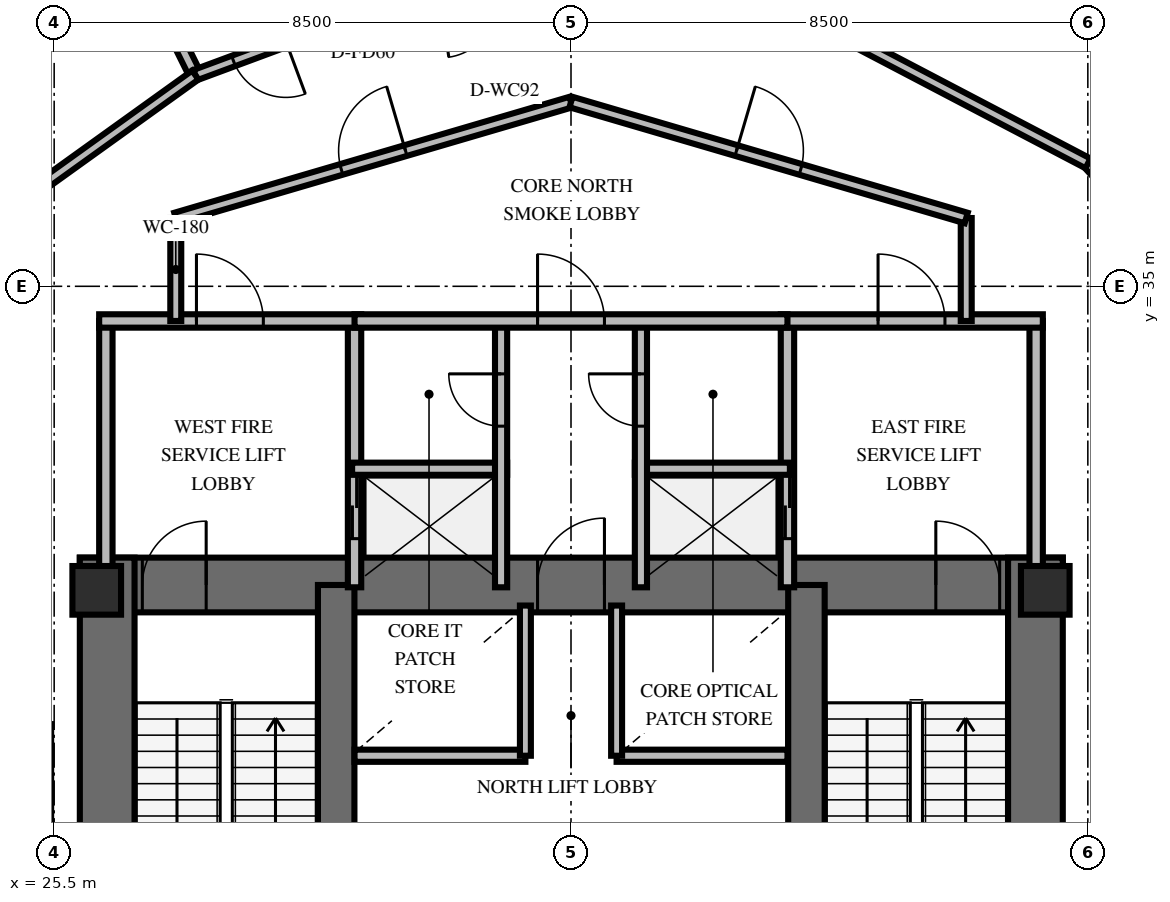
"""IFC4 building model, lengths in metres.
Left out: names, types, materials, properties, quantities, classifications, styles, units other than length and angle.
Written with IfcOpenShell. Run it as: python <this file> out.ifc"""

import sys

from ifc_helpers import new_model, si_unit, direction, frame, frame_2d, origin, origin_2d, place, context, subcontext, project, spatial, rectangle, extrude, element, fill, save


model = new_model("IFC4")
c1 = context("Model", 3, precision=1e-05, world=origin(), true_north=direction((0.0, 1.0)))
c2 = subcontext(c1, "Body", "Model", "MODEL_VIEW")
j1 = project(units=[si_unit("LENGTHUNIT", "METRE"), si_unit("PLANEANGLEUNIT", "RADIAN")], contexts=[c1])
p1 = place(None, origin())
s1 = spatial("IfcSite", under=j1, at=p1, CompositionType="ELEMENT")
p2 = place(p1, origin())
s2 = spatial("IfcBuilding", under=s1, at=p2, CompositionType="ELEMENT")
p3 = place(p2, frame((0.0, 0.0, 84.6)))
s3 = spatial("IfcBuildingStorey", under=s2, at=p3, CompositionType="ELEMENT", Elevation=84.6)
p4 = place(p3, frame((25.922, 30.088, 0.0), z_axis=(0.0, 0.0, 1.0), x_axis=(1.0, 0.0, 0.0)))
e1 = element("IfcWall", 1, at=p4, inside=s3, PredefinedType="SHEAR", context=c2, shape_type="SweptSolid", body=[
    extrude(rectangle(XDim=16.166, YDim=0.9, at=frame_2d((8.083, 0.0))), origin(), (0.0, 0.0, 1.0), 4.2),
])
p5 = place(p4, frame((1.028, 0.0, 0.0)))
e2 = element("IfcOpeningElement", 2, at=p5, cuts=e1, PredefinedType="OPENING", context=c2, shape_type="SweptSolid", body=[
    extrude(rectangle(XDim=1.05, YDim=2.15, at=frame_2d((0.525, 1.075))), frame((0.0, 0.46, 0.0), z_axis=(0.0, -1.0, 0.0), x_axis=(1.0, 0.0, 0.0)), (0.0, 0.0, 1.0), 0.92),
])
p6 = place(p4, frame((14.078, 0.0, 0.0)))
e3 = element("IfcOpeningElement", 3, at=p6, cuts=e1, PredefinedType="OPENING", context=c2, shape_type="SweptSolid", body=[
    extrude(rectangle(XDim=1.05, YDim=2.15, at=frame_2d((0.525, 1.075))), frame((0.0, 0.46, 0.0), z_axis=(0.0, -1.0, 0.0), x_axis=(1.0, 0.0, 0.0)), (0.0, 0.0, 1.0), 0.92),
])
p7 = place(p4, frame((7.528, 0.0, 0.0)))
e4 = element("IfcOpeningElement", 4, at=p7, cuts=e1, PredefinedType="OPENING", context=c2, shape_type="SweptSolid", body=[
    extrude(rectangle(XDim=1.1, YDim=2.15, at=frame_2d((0.55, 1.075))), frame((0.0, 0.46, 0.0), z_axis=(0.0, -1.0, 0.0), x_axis=(1.0, 0.0, 0.0)), (0.0, 0.0, 1.0), 0.92),
])
for number, where, z_axis, x_axis in (
    (5, (26.372, 19.662, 0.0), (0.0, 0.0, 1.0), (0.0, 1.0, 0.0)),
    (6, (41.638, 19.662, 0.0), (0.0, 0.0, 1.0), (0.0, 1.0, 0.0)),
):
    element("IfcWall", number, at=place(p3, frame(where, z_axis=z_axis, x_axis=x_axis)), inside=s3, PredefinedType="SHEAR", context=c2, shape_type="SweptSolid", body=[
        extrude(rectangle(XDim=10.876, YDim=0.9, at=frame_2d((5.438, 0.0))), origin(), (0.0, 0.0, 1.0), 4.2),
    ])
for number, where, z_axis, x_axis in (
    (7, (30.138, 20.112, 0.0), (0.0, 0.0, 1.0), (0.0, 1.0, 0.0)),
    (8, (37.872, 20.112, 0.0), (0.0, 0.0, 1.0), (0.0, 1.0, 0.0)),
):
    element("IfcWall", number, at=place(p3, frame(where, z_axis=z_axis, x_axis=x_axis)), inside=s3, PredefinedType="SHEAR", context=c2, shape_type="SweptSolid", body=[
        extrude(rectangle(XDim=9.976, YDim=0.6, at=frame_2d((4.988, 0.0))), origin(), (0.0, 0.0, 1.0), 4.2),
    ])
for number, where, z_axis, x_axis in (
    (9, (26.2, 30.0, 0.0), (0.0, 0.0, 1.0), (1.0, 0.0, 0.0)),
    (10, (41.8, 30.0, 0.0), (0.0, 0.0, 1.0), (1.0, 0.0, 0.0)),
):
    element("IfcColumn", number, at=place(p3, frame(where, z_axis=z_axis, x_axis=x_axis)), inside=s3, PredefinedType="PILASTER", context=c2, shape_type="SweptSolid", body=[
        extrude(rectangle(XDim=0.8, YDim=0.8, at=origin_2d()), origin(), (0.0, 0.0, 1.0), 4.2),
    ])
p8 = place(p3, frame((26.35, 30.05, 0.0), z_axis=(0.0, 0.0, 1.0), x_axis=(0.0, 1.0, 0.0)))
e11 = element("IfcWall", 11, at=p8, inside=s3, PredefinedType="SOLIDWALL", context=c2, shape_type="SweptSolid", body=[
    extrude(rectangle(XDim=4.38, YDim=0.22, at=frame_2d((2.19, 0.0))), origin(), (0.0, 0.0, 1.0), 2.96),
])
p9 = place(p3, frame((30.44, 30.05, 0.0), z_axis=(0.0, 0.0, 1.0), x_axis=(0.0, 1.0, 0.0)))
e12 = element("IfcWall", 12, at=p9, inside=s3, PredefinedType="SOLIDWALL", context=c2, shape_type="SweptSolid", body=[
    extrude(rectangle(XDim=4.38, YDim=0.22, at=frame_2d((2.19, 0.0))), origin(), (0.0, 0.0, 1.0), 2.96),
])
p10 = place(p9, frame((0.8, 0.0, 0.0)))
e13 = element("IfcOpeningElement", 13, at=p10, cuts=e12, PredefinedType="OPENING", context=c2, shape_type="SweptSolid", body=[
    extrude(rectangle(XDim=1.05, YDim=2.1, at=frame_2d((0.525, 1.05))), frame((0.0, 0.12, 0.0), z_axis=(0.0, -1.0, 0.0), x_axis=(1.0, 0.0, 0.0)), (0.0, 0.0, 1.0), 0.24),
])
p11 = place(p3, frame((26.24, 34.43, 0.0), z_axis=(0.0, 0.0, 1.0), x_axis=(1.0, 0.0, 0.0)))
e14 = element("IfcWall", 14, at=p11, inside=s3, PredefinedType="SOLIDWALL", context=c2, shape_type="SweptSolid", body=[
    extrude(rectangle(XDim=4.31, YDim=0.22, at=frame_2d((2.155, 0.0))), origin(), (0.0, 0.0, 1.0), 2.96),
])
p12 = place(p11, frame((1.6, 0.0, 0.0)))
e15 = element("IfcOpeningElement", 15, at=p12, cuts=e14, PredefinedType="OPENING", context=c2, shape_type="SweptSolid", body=[
    extrude(rectangle(XDim=1.1, YDim=2.15, at=frame_2d((0.55, 1.075))), frame((0.0, 0.12, 0.0), z_axis=(0.0, -1.0, 0.0), x_axis=(1.0, 0.0, 0.0)), (0.0, 0.0, 1.0), 0.24),
])
p13 = place(p3, frame((30.4, 32.0, 0.0), z_axis=(0.0, 0.0, 1.0), x_axis=(1.0, 0.0, 0.0)))
e16 = element("IfcWall", 16, at=p13, inside=s3, PredefinedType="SOLIDWALL", context=c2, shape_type="SweptSolid", body=[
    extrude(rectangle(XDim=2.55, YDim=0.2, at=frame_2d((1.275, 0.0))), origin(), (0.0, 0.0, 1.0), 2.96),
])
p14 = place(p3, frame((32.85, 30.05, 0.0), z_axis=(0.0, 0.0, 1.0), x_axis=(0.0, 1.0, 0.0)))
e17 = element("IfcWall", 17, at=p14, inside=s3, PredefinedType="SOLIDWALL", context=c2, shape_type="SweptSolid", body=[
    extrude(rectangle(XDim=4.38, YDim=0.2, at=frame_2d((2.19, 0.0))), origin(), (0.0, 0.0, 1.0), 2.96),
])
p15 = place(p14, frame((2.65, 0.0, 0.0)))
e18 = element("IfcOpeningElement", 18, at=p15, cuts=e17, PredefinedType="OPENING", context=c2, shape_type="SweptSolid", body=[
    extrude(rectangle(XDim=0.86, YDim=2.05, at=frame_2d((0.43, 1.025))), frame((0.0, 0.11, 0.0), z_axis=(0.0, -1.0, 0.0), x_axis=(1.0, 0.0, 0.0)), (0.0, 0.0, 1.0), 0.22),
])
p16 = place(p3, frame((37.56, 30.05, 0.0), z_axis=(0.0, 0.0, 1.0), x_axis=(0.0, 1.0, 0.0)))
e19 = element("IfcWall", 19, at=p16, inside=s3, PredefinedType="SOLIDWALL", context=c2, shape_type="SweptSolid", body=[
    extrude(rectangle(XDim=4.38, YDim=0.22, at=frame_2d((2.19, 0.0))), origin(), (0.0, 0.0, 1.0), 2.96),
])
p17 = place(p16, frame((0.8, 0.0, 0.0)))
e20 = element("IfcOpeningElement", 20, at=p17, cuts=e19, PredefinedType="OPENING", context=c2, shape_type="SweptSolid", body=[
    extrude(rectangle(XDim=1.05, YDim=2.1, at=frame_2d((0.525, 1.05))), frame((0.0, 0.12, 0.0), z_axis=(0.0, -1.0, 0.0), x_axis=(1.0, 0.0, 0.0)), (0.0, 0.0, 1.0), 0.24),
])
p18 = place(p3, frame((41.65, 30.05, 0.0), z_axis=(0.0, 0.0, 1.0), x_axis=(0.0, 1.0, 0.0)))
e21 = element("IfcWall", 21, at=p18, inside=s3, PredefinedType="SOLIDWALL", context=c2, shape_type="SweptSolid", body=[
    extrude(rectangle(XDim=4.38, YDim=0.22, at=frame_2d((2.19, 0.0))), origin(), (0.0, 0.0, 1.0), 2.96),
])
p19 = place(p3, frame((37.45, 34.43, 0.0), z_axis=(0.0, 0.0, 1.0), x_axis=(1.0, 0.0, 0.0)))
e22 = element("IfcWall", 22, at=p19, inside=s3, PredefinedType="SOLIDWALL", context=c2, shape_type="SweptSolid", body=[
    extrude(rectangle(XDim=4.31, YDim=0.22, at=frame_2d((2.155, 0.0))), origin(), (0.0, 0.0, 1.0), 2.96),
])
p20 = place(p19, frame((1.6, 0.0, 0.0)))
e23 = element("IfcOpeningElement", 23, at=p20, cuts=e22, PredefinedType="OPENING", context=c2, shape_type="SweptSolid", body=[
    extrude(rectangle(XDim=1.1, YDim=2.15, at=frame_2d((0.55, 1.075))), frame((0.0, 0.12, 0.0), z_axis=(0.0, -1.0, 0.0), x_axis=(1.0, 0.0, 0.0)), (0.0, 0.0, 1.0), 0.24),
])
p21 = place(p3, frame((35.05, 32.0, 0.0), z_axis=(0.0, 0.0, 1.0), x_axis=(1.0, 0.0, 0.0)))
e24 = element("IfcWall", 24, at=p21, inside=s3, PredefinedType="SOLIDWALL", context=c2, shape_type="SweptSolid", body=[
    extrude(rectangle(XDim=2.55, YDim=0.2, at=frame_2d((1.275, 0.0))), origin(), (0.0, 0.0, 1.0), 2.96),
])
p22 = place(p3, frame((35.15, 30.05, 0.0), z_axis=(0.0, 0.0, 1.0), x_axis=(0.0, 1.0, 0.0)))
e25 = element("IfcWall", 25, at=p22, inside=s3, PredefinedType="SOLIDWALL", context=c2, shape_type="SweptSolid", body=[
    extrude(rectangle(XDim=4.38, YDim=0.2, at=frame_2d((2.19, 0.0))), origin(), (0.0, 0.0, 1.0), 2.96),
])
p23 = place(p22, frame((2.65, 0.0, 0.0)))
e26 = element("IfcOpeningElement", 26, at=p23, cuts=e25, PredefinedType="OPENING", context=c2, shape_type="SweptSolid", body=[
    extrude(rectangle(XDim=0.86, YDim=2.05, at=frame_2d((0.43, 1.025))), frame((0.0, 0.11, 0.0), z_axis=(0.0, -1.0, 0.0), x_axis=(1.0, 0.0, 0.0)), (0.0, 0.0, 1.0), 0.22),
])
p24 = place(p3, frame((30.44, 34.43, 0.0), z_axis=(0.0, 0.0, 1.0), x_axis=(1.0, 0.0, 0.0)))
e27 = element("IfcWall", 27, at=p24, inside=s3, PredefinedType="SOLIDWALL", context=c2, shape_type="SweptSolid", body=[
    extrude(rectangle(XDim=7.12, YDim=0.22, at=frame_2d((3.56, 0.0))), origin(), (0.0, 0.0, 1.0), 2.96),
])
p25 = place(p24, frame((3.01, 0.0, 0.0)))
e28 = element("IfcOpeningElement", 28, at=p25, cuts=e27, PredefinedType="OPENING", context=c2, shape_type="SweptSolid", body=[
    extrude(rectangle(XDim=1.1, YDim=2.15, at=frame_2d((0.55, 1.075))), frame((0.0, 0.12, 0.0), z_axis=(0.0, -1.0, 0.0), x_axis=(1.0, 0.0, 0.0)), (0.0, 0.0, 1.0), 0.24),
])
p26 = place(p3, frame((30.44, 27.28, 0.0), z_axis=(0.0, 0.0, 1.0), x_axis=(1.0, 0.0, 0.0)))
e29 = element("IfcWall", 29, at=p26, inside=s3, PredefinedType="SOLIDWALL", context=c2, shape_type="SweptSolid", body=[
    extrude(rectangle(XDim=2.81, YDim=0.2, at=frame_2d((1.405, 0.0))), origin(), (0.0, 0.0, 1.0), 2.96),
])
p27 = place(p3, frame((33.25, 27.28, 0.0), z_axis=(0.0, 0.0, 1.0), x_axis=(0.0, 1.0, 0.0)))
e30 = element("IfcWall", 30, at=p27, inside=s3, PredefinedType="SOLIDWALL", context=c2, shape_type="SweptSolid", body=[
    extrude(rectangle(XDim=2.47, YDim=0.18, at=frame_2d((1.235, 0.0))), origin(), (0.0, 0.0, 1.0), 2.96),
])
p28 = place(p3, frame((34.75, 27.28, 0.0), z_axis=(0.0, 0.0, 1.0), x_axis=(1.0, 0.0, 0.0)))
e31 = element("IfcWall", 31, at=p28, inside=s3, PredefinedType="SOLIDWALL", context=c2, shape_type="SweptSolid", body=[
    extrude(rectangle(XDim=2.81, YDim=0.2, at=frame_2d((1.405, 0.0))), origin(), (0.0, 0.0, 1.0), 2.96),
])
p29 = place(p3, frame((34.75, 27.28, 0.0), z_axis=(0.0, 0.0, 1.0), x_axis=(0.0, 1.0, 0.0)))
e32 = element("IfcWall", 32, at=p29, inside=s3, PredefinedType="SOLIDWALL", context=c2, shape_type="SweptSolid", body=[
    extrude(rectangle(XDim=2.47, YDim=0.18, at=frame_2d((1.235, 0.0))), origin(), (0.0, 0.0, 1.0), 2.96),
])
for number, where, z_axis, x_axis in (
    (33, (27.5, 34.43, 0.0), (0.0, 0.0, 1.0), (0.0, 1.0, 0.0)),
    (34, (40.5, 36.123, 0.0), (0.0, 0.0, 1.0), (0.0, -1.0, 0.0)),
):
    element("IfcWall", number, at=place(p3, frame(where, z_axis=z_axis, x_axis=x_axis)), inside=s3, PredefinedType="PARTITIONING", context=c2, shape_type="SweptSolid", body=[
        extrude(rectangle(XDim=1.693, YDim=0.18, at=frame_2d((0.846, 0.0))), origin(), (0.0, 0.0, 1.0), 2.96),
    ])
p30 = place(p3, frame((27.5, 36.123, 0.0), z_axis=(0.0, 0.0, 1.0), x_axis=(0.959546654541, 0.281549671923, 0.0)))
e35 = element("IfcWall", 35, at=p30, inside=s3, PredefinedType="PARTITIONING", context=c2, shape_type="SweptSolid", body=[
    extrude(rectangle(XDim=6.774, YDim=0.18, at=frame_2d((3.387, 0.0))), origin(), (0.0, 0.0, 1.0), 2.96),
])
p31 = place(p30, frame((2.837, 0.0, 0.0)))
e36 = element("IfcOpeningElement", 36, at=p31, cuts=e35, PredefinedType="OPENING", context=c2, shape_type="SweptSolid", body=[
    extrude(rectangle(XDim=1.1, YDim=2.15, at=frame_2d((0.55, 1.075))), frame((0.0, 0.1, 0.0), z_axis=(0.0, -1.0, 0.0), x_axis=(1.0, 0.0, 0.0)), (0.0, 0.0, 1.0), 0.2),
])
p32 = place(p3, frame((34.0, 38.03, 0.0), z_axis=(0.0, 0.0, 1.0), x_axis=(0.959546654541, -0.281549671923, 0.0)))
e37 = element("IfcWall", 37, at=p32, inside=s3, PredefinedType="PARTITIONING", context=c2, shape_type="SweptSolid", body=[
    extrude(rectangle(XDim=6.774, YDim=0.18, at=frame_2d((3.387, 0.0))), origin(), (0.0, 0.0, 1.0), 2.96),
])
p33 = place(p32, frame((2.837, 0.0, 0.0)))
e38 = element("IfcOpeningElement", 38, at=p33, cuts=e37, PredefinedType="OPENING", context=c2, shape_type="SweptSolid", body=[
    extrude(rectangle(XDim=1.1, YDim=2.15, at=frame_2d((0.55, 1.075))), frame((0.0, 0.1, 0.0), z_axis=(0.0, -1.0, 0.0), x_axis=(1.0, 0.0, 0.0)), (0.0, 0.0, 1.0), 0.2),
])
p34 = place(p3, frame((27.822, 38.474, 0.0), z_axis=(0.0, 0.0, 1.0), x_axis=(-0.443837252061, 0.896107411912, 0.0)))
e39 = element("IfcWall", 39, at=p34, inside=s3, PredefinedType="PLUMBINGWALL", context=c2, shape_type="SweptSolid", body=[
    extrude(rectangle(XDim=1.65, YDim=0.2, at=frame_2d((0.825, 0.0))), origin(), (0.0, 0.0, 1.0), 2.96),
])
p35 = place(p3, frame((30.55, 39.486, 0.0), z_axis=(0.0, 0.0, 1.0), x_axis=(-0.937591807845, -0.34773783496, 0.0)))
e40 = element("IfcWall", 40, at=p35, inside=s3, PredefinedType="PARTITIONING", context=c2, shape_type="SweptSolid", body=[
    extrude(rectangle(XDim=2.91, YDim=0.18, at=frame_2d((1.455, 0.0))), origin(), (0.0, 0.0, 1.0), 2.96),
])
p36 = place(p35, frame((1.321, 0.0, 0.0)))
e41 = element("IfcOpeningElement", 41, at=p36, cuts=e40, PredefinedType="OPENING", context=c2, shape_type="SweptSolid", body=[
    extrude(rectangle(XDim=0.92, YDim=2.1, at=frame_2d((0.46, 1.05))), frame((0.0, 0.1, 0.0), z_axis=(0.0, -1.0, 0.0), x_axis=(1.0, 0.0, 0.0)), (0.0, 0.0, 1.0), 0.2),
])
p37 = place(p3, frame((27.822, 38.474, 0.0), z_axis=(0.0, 0.0, 1.0), x_axis=(-0.812254756388, -0.583302846492, 0.0)))
e42 = element("IfcWall", 42, at=p37, inside=s3, PredefinedType="PARTITIONING", context=c2, shape_type="SweptSolid", body=[
    extrude(rectangle(XDim=4.515, YDim=0.18, at=frame_2d((2.257, 0.0))), origin(), (0.0, 0.0, 1.0), 2.96),
])
p38 = place(p3, frame((45.76, 33.448, 0.0), z_axis=(0.0, 0.0, 1.0), x_axis=(-0.673677614221, 0.739025352811, 0.0)))
e43 = element("IfcWall", 43, at=p38, inside=s3, PredefinedType="PARTITIONING", context=c2, shape_type="SweptSolid", body=[
    extrude(rectangle(XDim=4.834, YDim=0.18, at=frame_2d((2.417, 0.0))), origin(), (0.0, 0.0, 1.0), 2.96),
])
p39 = place(p38, frame((2.801, 0.0, 0.0)))
e44 = element("IfcOpeningElement", 44, at=p39, cuts=e43, PredefinedType="OPENING", context=c2, shape_type="SweptSolid", body=[
    extrude(rectangle(XDim=1.0, YDim=2.15, at=frame_2d((0.5, 1.075))), frame((0.0, 0.1, 0.0), z_axis=(0.0, -1.0, 0.0), x_axis=(1.0, 0.0, 0.0)), (0.0, 0.0, 1.0), 0.2),
])
p40 = place(p3, frame((42.503, 37.021, 0.0), z_axis=(0.0, 0.0, 1.0), x_axis=(-0.885791991461, 0.464082479591, 0.0)))
e45 = element("IfcWall", 45, at=p40, inside=s3, PredefinedType="PARTITIONING", context=c2, shape_type="SweptSolid", body=[
    extrude(rectangle(XDim=4.834, YDim=0.18, at=frame_2d((2.417, 0.0))), origin(), (0.0, 0.0, 1.0), 2.96),
])
p41 = place(p5, origin())
e46 = element("IfcDoor", 46, at=p41, inside=s3, OperationType="SINGLE_SWING_RIGHT", PredefinedType="DOOR", context=c2, shape_type="SweptSolid", body=[
    extrude(rectangle(XDim=1.05, YDim=2.15, at=frame_2d((0.525, 1.075))), frame((0.0, 0.025, 0.0), z_axis=(0.0, -1.0, 0.0), x_axis=(1.0, 0.0, 0.0)), (0.0, 0.0, 1.0), 0.05),
])
fill(e2, e46)
p42 = place(p6, origin())
e47 = element("IfcDoor", 47, at=p42, inside=s3, OperationType="SINGLE_SWING_LEFT", PredefinedType="DOOR", context=c2, shape_type="SweptSolid", body=[
    extrude(rectangle(XDim=1.05, YDim=2.15, at=frame_2d((0.525, 1.075))), frame((0.0, 0.025, 0.0), z_axis=(0.0, -1.0, 0.0), x_axis=(1.0, 0.0, 0.0)), (0.0, 0.0, 1.0), 0.05),
])
fill(e3, e47)
p43 = place(p7, origin())
e48 = element("IfcDoor", 48, at=p43, inside=s3, OperationType="SINGLE_SWING_RIGHT", PredefinedType="DOOR", context=c2, shape_type="SweptSolid", body=[
    extrude(rectangle(XDim=1.1, YDim=2.15, at=frame_2d((0.55, 1.075))), frame((0.0, 0.025, 0.0), z_axis=(0.0, -1.0, 0.0), x_axis=(1.0, 0.0, 0.0)), (0.0, 0.0, 1.0), 0.05),
])
fill(e4, e48)
p44 = place(p12, origin())
e49 = element("IfcDoor", 49, at=p44, inside=s3, OperationType="SINGLE_SWING_LEFT", PredefinedType="DOOR", context=c2, shape_type="SweptSolid", body=[
    extrude(rectangle(XDim=1.1, YDim=2.15, at=frame_2d((0.55, 1.075))), frame((0.0, 0.025, 0.0), z_axis=(0.0, -1.0, 0.0), x_axis=(1.0, 0.0, 0.0)), (0.0, 0.0, 1.0), 0.05),
])
fill(e15, e49)
p45 = place(p10, origin())
e50 = element("IfcDoor", 50, at=p45, inside=s3, OperationType="DOUBLE_DOOR_SLIDING", PredefinedType="USERDEFINED", context=c2, shape_type="SweptSolid", body=[
    extrude(rectangle(XDim=1.05, YDim=2.1, at=frame_2d((0.525, 1.05))), frame((0.0, 0.025, 0.0), z_axis=(0.0, -1.0, 0.0), x_axis=(1.0, 0.0, 0.0)), (0.0, 0.0, 1.0), 0.05),
])
fill(e13, e50)
p46 = place(p15, origin())
e51 = element("IfcDoor", 51, at=p46, inside=s3, OperationType="SINGLE_SWING_RIGHT", PredefinedType="TRAPDOOR", context=c2, shape_type="SweptSolid", body=[
    extrude(rectangle(XDim=0.86, YDim=2.05, at=frame_2d((0.43, 1.025))), frame((0.0, 0.025, 0.0), z_axis=(0.0, -1.0, 0.0), x_axis=(1.0, 0.0, 0.0)), (0.0, 0.0, 1.0), 0.05),
])
fill(e18, e51)
p47 = place(p20, origin())
e52 = element("IfcDoor", 52, at=p47, inside=s3, OperationType="SINGLE_SWING_LEFT", PredefinedType="DOOR", context=c2, shape_type="SweptSolid", body=[
    extrude(rectangle(XDim=1.1, YDim=2.15, at=frame_2d((0.55, 1.075))), frame((0.0, 0.025, 0.0), z_axis=(0.0, -1.0, 0.0), x_axis=(1.0, 0.0, 0.0)), (0.0, 0.0, 1.0), 0.05),
])
fill(e23, e52)
p48 = place(p17, origin())
e53 = element("IfcDoor", 53, at=p48, inside=s3, OperationType="DOUBLE_DOOR_SLIDING", PredefinedType="USERDEFINED", context=c2, shape_type="SweptSolid", body=[
    extrude(rectangle(XDim=1.05, YDim=2.1, at=frame_2d((0.525, 1.05))), frame((0.0, 0.025, 0.0), z_axis=(0.0, -1.0, 0.0), x_axis=(1.0, 0.0, 0.0)), (0.0, 0.0, 1.0), 0.05),
])
fill(e20, e53)
p49 = place(p23, origin())
e54 = element("IfcDoor", 54, at=p49, inside=s3, OperationType="SINGLE_SWING_RIGHT", PredefinedType="TRAPDOOR", context=c2, shape_type="SweptSolid", body=[
    extrude(rectangle(XDim=0.86, YDim=2.05, at=frame_2d((0.43, 1.025))), frame((0.0, 0.025, 0.0), z_axis=(0.0, -1.0, 0.0), x_axis=(1.0, 0.0, 0.0)), (0.0, 0.0, 1.0), 0.05),
])
fill(e26, e54)
p50 = place(p25, origin())
e55 = element("IfcDoor", 55, at=p50, inside=s3, OperationType="SINGLE_SWING_LEFT", PredefinedType="DOOR", context=c2, shape_type="SweptSolid", body=[
    extrude(rectangle(XDim=1.1, YDim=2.15, at=frame_2d((0.55, 1.075))), frame((0.0, 0.025, 0.0), z_axis=(0.0, -1.0, 0.0), x_axis=(1.0, 0.0, 0.0)), (0.0, 0.0, 1.0), 0.05),
])
fill(e28, e55)
p51 = place(p31, origin())
e56 = element("IfcDoor", 56, at=p51, inside=s3, OperationType="SINGLE_SWING_RIGHT", PredefinedType="DOOR", context=c2, shape_type="SweptSolid", body=[
    extrude(rectangle(XDim=1.1, YDim=2.15, at=frame_2d((0.55, 1.075))), frame((0.0, 0.025, 0.0), z_axis=(0.0, -1.0, 0.0), x_axis=(1.0, 0.0, 0.0)), (0.0, 0.0, 1.0), 0.05),
])
fill(e36, e56)
p52 = place(p33, origin())
e57 = element("IfcDoor", 57, at=p52, inside=s3, OperationType="SINGLE_SWING_LEFT", PredefinedType="DOOR", context=c2, shape_type="SweptSolid", body=[
    extrude(rectangle(XDim=1.1, YDim=2.15, at=frame_2d((0.55, 1.075))), frame((0.0, 0.025, 0.0), z_axis=(0.0, -1.0, 0.0), x_axis=(1.0, 0.0, 0.0)), (0.0, 0.0, 1.0), 0.05),
])
fill(e38, e57)
p53 = place(p36, origin())
e58 = element("IfcDoor", 58, at=p53, inside=s3, OperationType="SINGLE_SWING_LEFT", PredefinedType="DOOR", context=c2, shape_type="SweptSolid", body=[
    extrude(rectangle(XDim=0.92, YDim=2.1, at=frame_2d((0.46, 1.05))), frame((0.0, 0.025, 0.0), z_axis=(0.0, -1.0, 0.0), x_axis=(1.0, 0.0, 0.0)), (0.0, 0.0, 1.0), 0.05),
])
fill(e41, e58)
save(model, sys.argv[1])
